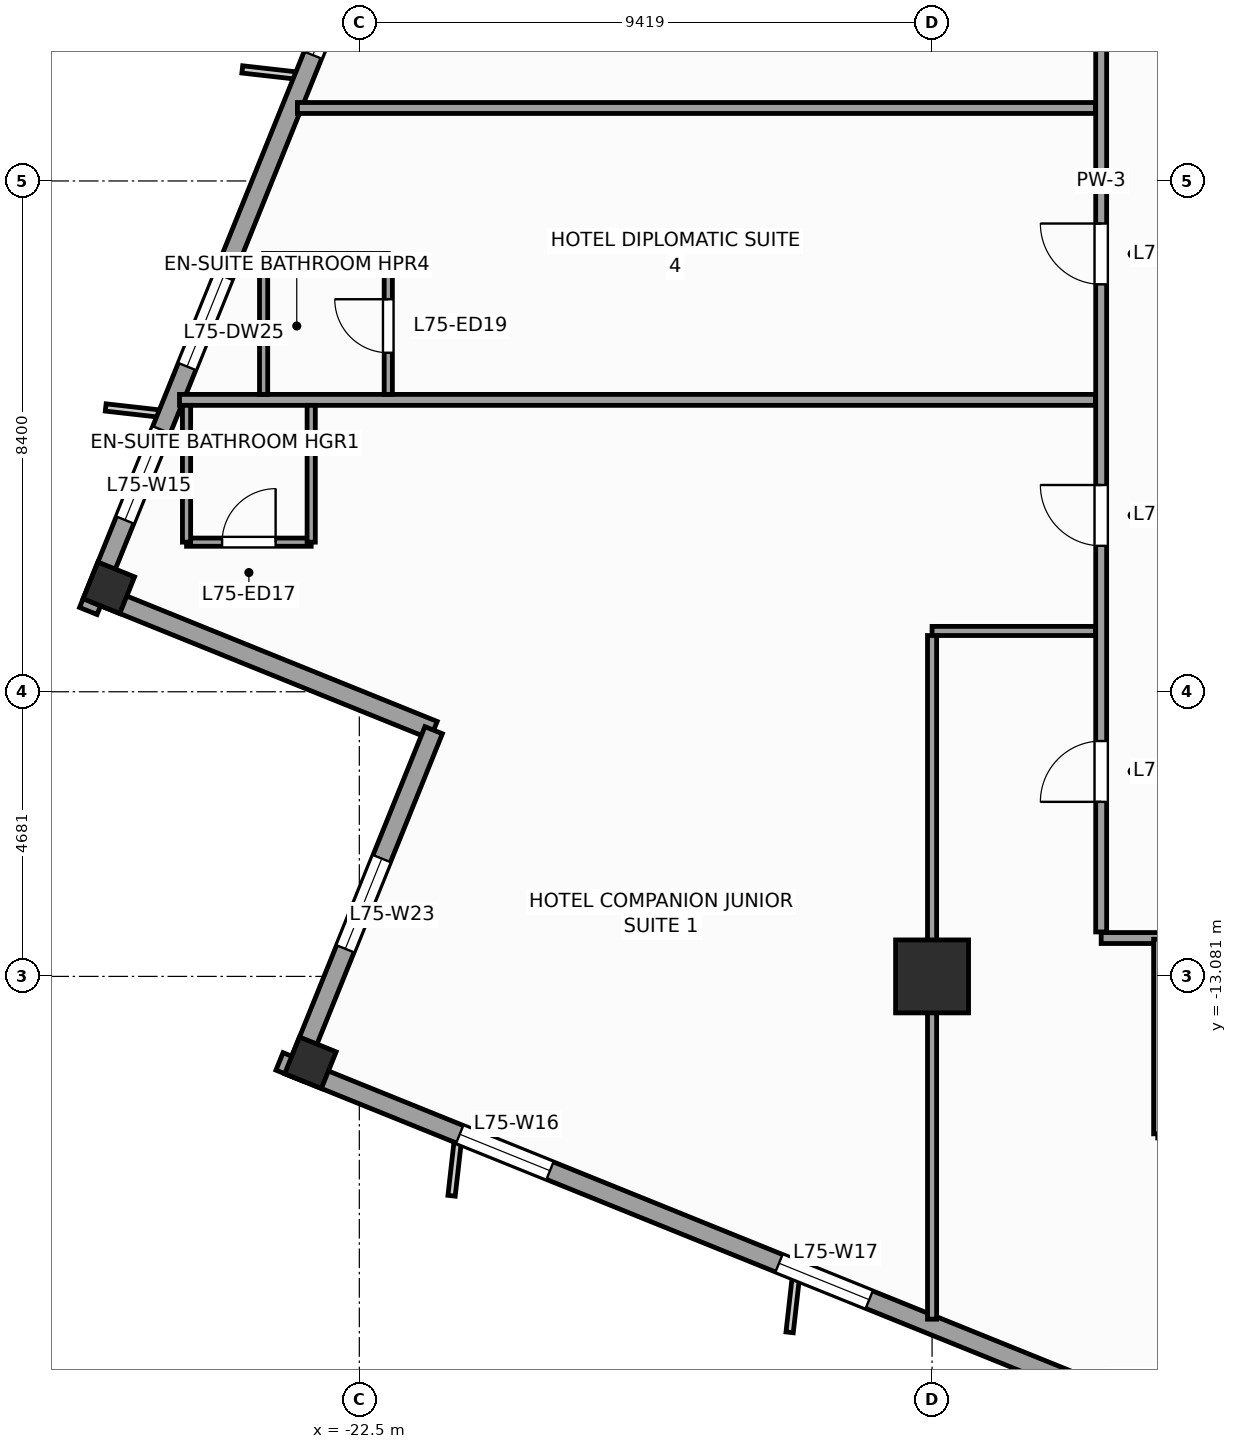
"""IFC4 building model, lengths in metres.
Left out: names, types, materials, properties, quantities, classifications, styles, units other than length and angle.
Written with IfcOpenShell. Run it as: python <this file> out.ifc"""

import sys

from ifc_helpers import new_model, si_unit, direction, frame, frame_2d, origin, origin_2d, place, context, subcontext, project, spatial, rectangle, extrude, source, transform, mapped, element, fill, save


model = new_model("IFC4")
c1 = context("Model", 3, precision=1e-05, world=origin(), true_north=direction((0.0, 1.0)))
c2 = subcontext(c1, "Body", "Model", "MODEL_VIEW")
j1 = project(units=[si_unit("LENGTHUNIT", "METRE"), si_unit("PLANEANGLEUNIT", "RADIAN")], contexts=[c1])
p1 = place(None, origin())
s1 = spatial("IfcSite", under=j1, at=p1, CompositionType="ELEMENT")
p2 = place(p1, origin())
s2 = spatial("IfcBuilding", under=s1, at=p2, CompositionType="ELEMENT")
p3 = place(p2, frame((0.0, 0.0, 304.8)))
s3 = spatial("IfcBuildingStorey", under=s2, at=p3, CompositionType="ELEMENT", Elevation=304.8)
m1 = source(origin(), c2, "Body", "SweptSolid", [
    extrude(rectangle(XDim=1.2, YDim=1.2, at=origin_2d()), origin(), (0.0, 0.0, 1.0), 3.6),
])
p4 = place(p3, frame((-13.081, -13.081, 0.0), z_axis=(0.0, 0.0, 1.0), x_axis=(1.0, 0.0, 0.0)))
e1 = element("IfcColumn", 1, at=p4, inside=s3, PredefinedType="COLUMN", context=c2, shape_type="MappedRepresentation", body=[
    mapped(m1, transform((0.0, 0.0, 0.0), scale=1.0)),
])
m2 = source(origin(), c2, "Body", "SweptSolid", [
    extrude(rectangle(XDim=0.65, YDim=0.65, at=origin_2d()), origin(), (0.0, 0.0, 1.0), 3.6),
])
for number, where, z_axis, x_axis in (
    (2, (-26.62, -6.69, 0.0), (0.0, 0.0, 1.0), (0.375, 0.927, 0.0)),
    (3, (-23.304, -14.501, 0.0), (0.0, 0.0, 1.0), (0.375, 0.927, 0.0)),
):
    element("IfcColumn", number, at=place(p3, frame(where, z_axis=z_axis, x_axis=x_axis)), inside=s3, PredefinedType="COLUMN", context=c2, shape_type="MappedRepresentation", body=[
        mapped(m2, transform((0.0, 0.0, 0.0), scale=1.0)),
    ])
p5 = place(p3, frame((-14.479, 23.813, 0.0), z_axis=(0.0, 0.0, 1.0), x_axis=(-0.374609557019, -0.927182657188, 0.0)))
e4 = element("IfcWall", 4, at=p5, inside=s3, PredefinedType="STANDARD", context=c2, shape_type="SweptSolid", body=[
    extrude(rectangle(XDim=33.31, YDim=0.31, at=frame_2d((16.655, 0.0))), origin(), (0.0, 0.0, 1.0), 2.75),
])
p6 = place(p5, frame((10.53, 0.0, 0.0)))
e5 = element("IfcOpeningElement", 5, at=p6, cuts=e4, PredefinedType="OPENING", context=c2, shape_type="SweptSolid", body=[
    extrude(rectangle(XDim=1.05, YDim=2.25, at=frame_2d((0.525, 1.125))), frame((0.0, 0.165, 0.0), z_axis=(0.0, -1.0, 0.0), x_axis=(1.0, 0.0, 0.0)), (0.0, 0.0, 1.0), 0.33),
])
p7 = place(p5, frame((3.197, 0.0, 0.47)))
e6 = element("IfcOpeningElement", 6, at=p7, cuts=e4, PredefinedType="OPENING", context=c2, shape_type="SweptSolid", body=[
    extrude(rectangle(XDim=1.6, YDim=2.1, at=frame_2d((0.8, 1.05))), frame((0.0, 0.165, 0.0), z_axis=(0.0, -1.0, 0.0), x_axis=(1.0, 0.0, 0.0)), (0.0, 0.0, 1.0), 0.33),
])
p8 = place(p5, frame((7.36, 0.0, 0.47)))
e7 = element("IfcOpeningElement", 7, at=p8, cuts=e4, PredefinedType="OPENING", context=c2, shape_type="SweptSolid", body=[
    extrude(rectangle(XDim=1.6, YDim=2.1, at=frame_2d((0.8, 1.05))), frame((0.0, 0.165, 0.0), z_axis=(0.0, -1.0, 0.0), x_axis=(1.0, 0.0, 0.0)), (0.0, 0.0, 1.0), 0.33),
])
p9 = place(p5, frame((14.439, 0.0, 0.47)))
e8 = element("IfcOpeningElement", 8, at=p9, cuts=e4, PredefinedType="OPENING", context=c2, shape_type="SweptSolid", body=[
    extrude(rectangle(XDim=1.6, YDim=2.1, at=frame_2d((0.8, 1.05))), frame((0.0, 0.165, 0.0), z_axis=(0.0, -1.0, 0.0), x_axis=(1.0, 0.0, 0.0)), (0.0, 0.0, 1.0), 0.33),
])
p10 = place(p5, frame((21.851, 0.0, 0.47)))
e9 = element("IfcOpeningElement", 9, at=p10, cuts=e4, PredefinedType="OPENING", context=c2, shape_type="SweptSolid", body=[
    extrude(rectangle(XDim=1.6, YDim=2.1, at=frame_2d((0.8, 1.05))), frame((0.0, 0.165, 0.0), z_axis=(0.0, -1.0, 0.0), x_axis=(1.0, 0.0, 0.0)), (0.0, 0.0, 1.0), 0.33),
])
p11 = place(p5, frame((30.097, 0.0, 0.47)))
e10 = element("IfcOpeningElement", 10, at=p11, cuts=e4, PredefinedType="OPENING", context=c2, shape_type="SweptSolid", body=[
    extrude(rectangle(XDim=1.6, YDim=2.1, at=frame_2d((0.8, 1.05))), frame((0.0, 0.165, 0.0), z_axis=(0.0, -1.0, 0.0), x_axis=(1.0, 0.0, 0.0)), (0.0, 0.0, 1.0), 0.33),
])
p12 = place(p5, frame((27.374, 0.0, 0.47)))
e11 = element("IfcOpeningElement", 11, at=p12, cuts=e4, PredefinedType="OPENING", context=c2, shape_type="SweptSolid", body=[
    extrude(rectangle(XDim=1.6, YDim=2.1, at=frame_2d((0.8, 1.05))), frame((0.0, 0.165, 0.0), z_axis=(0.0, -1.0, 0.0), x_axis=(1.0, 0.0, 0.0)), (0.0, 0.0, 1.0), 0.33),
])
p13 = place(p3, frame((-26.841, -6.784, 0.0), z_axis=(0.0, 0.0, 1.0), x_axis=(0.927171722085, -0.374636620962, 0.0)))
e12 = element("IfcWall", 12, at=p13, inside=s3, PredefinedType="STANDARD", context=c2, shape_type="SweptSolid", body=[
    extrude(rectangle(XDim=6.0, YDim=0.31, at=frame_2d((3.0, 0.0))), origin(), (0.0, 0.0, 1.0), 2.65),
])
p14 = place(p3, frame((-21.278, -9.032, 0.0), z_axis=(0.0, 0.0, 1.0), x_axis=(-0.374602739196, -0.927185411764, 0.0)))
e13 = element("IfcWall", 13, at=p14, inside=s3, PredefinedType="STANDARD", context=c2, shape_type="SweptSolid", body=[
    extrude(rectangle(XDim=6.155, YDim=0.31, at=frame_2d((3.078, 0.0))), origin(), (0.0, 0.0, 1.0), 3.35),
])
p15 = place(p14, frame((2.278, 0.0, 0.47)))
e14 = element("IfcOpeningElement", 14, at=p15, cuts=e13, PredefinedType="OPENING", context=c2, shape_type="SweptSolid", body=[
    extrude(rectangle(XDim=1.6, YDim=2.1, at=frame_2d((0.8, 1.05))), frame((0.0, 0.165, 0.0), z_axis=(0.0, -1.0, 0.0), x_axis=(1.0, 0.0, 0.0)), (0.0, 0.0, 1.0), 0.33),
])
p16 = place(p3, frame((-23.813, -14.479, 0.0), z_axis=(0.0, 0.0, 1.0), x_axis=(0.927182657188, -0.374609557019, 0.0)))
e15 = element("IfcWall", 15, at=p16, inside=s3, PredefinedType="STANDARD", context=c2, shape_type="SweptSolid", body=[
    extrude(rectangle(XDim=33.31, YDim=0.31, at=frame_2d((16.655, 0.0))), origin(), (0.0, 0.0, 1.0), 2.75),
])
p17 = place(p16, frame((3.197, 0.0, 0.47)))
e16 = element("IfcOpeningElement", 16, at=p17, cuts=e15, PredefinedType="OPENING", context=c2, shape_type="SweptSolid", body=[
    extrude(rectangle(XDim=1.6, YDim=2.1, at=frame_2d((0.8, 1.05))), frame((0.0, 0.165, 0.0), z_axis=(0.0, -1.0, 0.0), x_axis=(1.0, 0.0, 0.0)), (0.0, 0.0, 1.0), 0.33),
])
p18 = place(p16, frame((8.86, 0.0, 0.47)))
e17 = element("IfcOpeningElement", 17, at=p18, cuts=e15, PredefinedType="OPENING", context=c2, shape_type="SweptSolid", body=[
    extrude(rectangle(XDim=1.6, YDim=2.1, at=frame_2d((0.8, 1.05))), frame((0.0, 0.165, 0.0), z_axis=(0.0, -1.0, 0.0), x_axis=(1.0, 0.0, 0.0)), (0.0, 0.0, 1.0), 0.33),
])
p19 = place(p16, frame((14.439, 0.0, 0.47)))
e18 = element("IfcOpeningElement", 18, at=p19, cuts=e15, PredefinedType="OPENING", context=c2, shape_type="SweptSolid", body=[
    extrude(rectangle(XDim=1.6, YDim=2.1, at=frame_2d((0.8, 1.05))), frame((0.0, 0.165, 0.0), z_axis=(0.0, -1.0, 0.0), x_axis=(1.0, 0.0, 0.0)), (0.0, 0.0, 1.0), 0.33),
])
p20 = place(p16, frame((23.351, 0.0, 0.47)))
e19 = element("IfcOpeningElement", 19, at=p20, cuts=e15, PredefinedType="OPENING", context=c2, shape_type="SweptSolid", body=[
    extrude(rectangle(XDim=1.6, YDim=2.1, at=frame_2d((0.8, 1.05))), frame((0.0, 0.165, 0.0), z_axis=(0.0, -1.0, 0.0), x_axis=(1.0, 0.0, 0.0)), (0.0, 0.0, 1.0), 0.33),
])
p21 = place(p16, frame((29.347, 0.0, 0.47)))
e20 = element("IfcOpeningElement", 20, at=p21, cuts=e15, PredefinedType="OPENING", context=c2, shape_type="SweptSolid", body=[
    extrude(rectangle(XDim=1.6, YDim=2.1, at=frame_2d((0.8, 1.05))), frame((0.0, 0.165, 0.0), z_axis=(0.0, -1.0, 0.0), x_axis=(1.0, 0.0, 0.0)), (0.0, 0.0, 1.0), 0.33),
])
p22 = place(p3, frame((-10.3, -12.45, 0.0), z_axis=(0.0, 0.0, 1.0), x_axis=(1.0, 0.0, 0.0)))
e21 = element("IfcWall", 21, at=p22, inside=s3, PredefinedType="PARTITIONING", context=c2, shape_type="SweptSolid", body=[
    extrude(rectangle(XDim=20.6, YDim=0.18, at=frame_2d((10.3, 0.0))), origin(), (0.0, 0.0, 1.0), 3.35),
])
p23 = place(p22, frame((1.605, 0.0, 0.0)))
e22 = element("IfcOpeningElement", 22, at=p23, cuts=e21, PredefinedType="OPENING", context=c2, shape_type="SweptSolid", body=[
    extrude(rectangle(XDim=0.95, YDim=2.1, at=frame_2d((0.475, 1.05))), frame((0.0, 0.1, 0.0), z_axis=(0.0, -1.0, 0.0), x_axis=(1.0, 0.0, 0.0)), (0.0, 0.0, 1.0), 0.2),
])
p24 = place(p22, frame((16.036, 0.0, 0.0)))
e23 = element("IfcOpeningElement", 23, at=p24, cuts=e21, PredefinedType="OPENING", context=c2, shape_type="SweptSolid", body=[
    extrude(rectangle(XDim=1.0, YDim=2.15, at=frame_2d((0.5, 1.075))), frame((0.0, 0.1, 0.0), z_axis=(0.0, -1.0, 0.0), x_axis=(1.0, 0.0, 0.0)), (0.0, 0.0, 1.0), 0.2),
])
p25 = place(p22, frame((9.55, 0.0, 0.0)))
e24 = element("IfcOpeningElement", 24, at=p25, cuts=e21, PredefinedType="OPENING", context=c2, shape_type="SweptSolid", body=[
    extrude(rectangle(XDim=1.0, YDim=2.15, at=frame_2d((0.5, 1.075))), frame((0.0, 0.1, 0.0), z_axis=(0.0, -1.0, 0.0), x_axis=(1.0, 0.0, 0.0)), (0.0, 0.0, 1.0), 0.2),
])
p26 = place(p3, frame((-10.3, -12.35, 0.0), z_axis=(0.0, 0.0, 1.0), x_axis=(0.0, 1.0, 0.0)))
e25 = element("IfcWall", 25, at=p26, inside=s3, PredefinedType="PARTITIONING", context=c2, shape_type="SweptSolid", body=[
    extrude(rectangle(XDim=24.7, YDim=0.18, at=frame_2d((12.35, 0.0))), origin(), (0.0, 0.0, 1.0), 3.35),
])
p27 = place(p26, frame((16.15, 0.0, 0.0)))
e26 = element("IfcOpeningElement", 26, at=p27, cuts=e25, PredefinedType="OPENING", context=c2, shape_type="SweptSolid", body=[
    extrude(rectangle(XDim=1.0, YDim=2.15, at=frame_2d((0.5, 1.075))), frame((0.0, 0.1, 0.0), z_axis=(0.0, -1.0, 0.0), x_axis=(1.0, 0.0, 0.0)), (0.0, 0.0, 1.0), 0.2),
])
p28 = place(p26, frame((2.139, 0.0, 0.0)))
e27 = element("IfcOpeningElement", 27, at=p28, cuts=e25, PredefinedType="OPENING", context=c2, shape_type="SweptSolid", body=[
    extrude(rectangle(XDim=1.0, YDim=2.15, at=frame_2d((0.5, 1.075))), frame((0.0, 0.1, 0.0), z_axis=(0.0, -1.0, 0.0), x_axis=(1.0, 0.0, 0.0)), (0.0, 0.0, 1.0), 0.2),
])
p29 = place(p26, frame((6.35, 0.0, 0.0)))
e28 = element("IfcOpeningElement", 28, at=p29, cuts=e25, PredefinedType="OPENING", context=c2, shape_type="SweptSolid", body=[
    extrude(rectangle(XDim=1.0, YDim=2.15, at=frame_2d((0.5, 1.075))), frame((0.0, 0.1, 0.0), z_axis=(0.0, -1.0, 0.0), x_axis=(1.0, 0.0, 0.0)), (0.0, 0.0, 1.0), 0.2),
])
p30 = place(p26, frame((10.65, 0.0, 0.0)))
e29 = element("IfcOpeningElement", 29, at=p30, cuts=e25, PredefinedType="OPENING", context=c2, shape_type="SweptSolid", body=[
    extrude(rectangle(XDim=1.0, YDim=2.15, at=frame_2d((0.5, 1.075))), frame((0.0, 0.1, 0.0), z_axis=(0.0, -1.0, 0.0), x_axis=(1.0, 0.0, 0.0)), (0.0, 0.0, 1.0), 0.2),
])
p31 = place(p3, frame((-10.395, -3.6, 0.0), z_axis=(0.0, 0.0, 1.0), x_axis=(-1.0, 0.0, 0.0)))
e30 = element("IfcWall", 30, at=p31, inside=s3, PredefinedType="PARTITIONING", context=c2, shape_type="SweptSolid", body=[
    extrude(rectangle(XDim=15.062, YDim=0.18, at=frame_2d((7.531, 0.0))), origin(), (0.0, 0.0, 1.0), 3.35),
])
p32 = place(p3, frame((-10.395, 1.2, 0.0), z_axis=(0.0, 0.0, 1.0), x_axis=(-1.0, 0.0, 0.0)))
e31 = element("IfcWall", 31, at=p32, inside=s3, PredefinedType="PARTITIONING", context=c2, shape_type="SweptSolid", body=[
    extrude(rectangle(XDim=13.123, YDim=0.18, at=frame_2d((6.562, 0.0))), origin(), (0.0, 0.0, 1.0), 3.35),
])
p33 = place(p3, frame((-10.395, -7.4, 0.0), z_axis=(0.0, 0.0, 1.0), x_axis=(-1.0, 0.0, 0.0)))
e32 = element("IfcWall", 32, at=p33, inside=s3, PredefinedType="PARTITIONING", context=c2, shape_type="SweptSolid", body=[
    extrude(rectangle(XDim=2.686, YDim=0.15, at=frame_2d((1.343, 0.0))), origin(), (0.0, 0.0, 1.0), 3.35),
])
p34 = place(p3, frame((-13.081, -7.475, 0.0), z_axis=(0.0, 0.0, 1.0), x_axis=(0.0, -1.0, 0.0)))
e33 = element("IfcWall", 33, at=p34, inside=s3, PredefinedType="PARTITIONING", context=c2, shape_type="SweptSolid", body=[
    extrude(rectangle(XDim=11.243, YDim=0.15, at=frame_2d((5.621, 0.0))), origin(), (0.0, 0.0, 1.0), 2.45),
])
p35 = place(p3, frame((-9.37, -15.67, 0.0), z_axis=(0.0, 0.0, 1.0), x_axis=(0.0, 1.0, 0.0)))
e34 = element("IfcWall", 34, at=p35, inside=s3, PredefinedType="PARTITIONING", context=c2, shape_type="SweptSolid", body=[
    extrude(rectangle(XDim=3.2, YDim=0.135, at=frame_2d((1.6, 0.0))), origin(), (0.0, 0.0, 1.0), 3.35),
])
p36 = place(p3, frame((-25.342, -5.94, 0.0), z_axis=(0.0, 0.0, 1.0), x_axis=(1.0, 0.0, 0.0)))
e35 = element("IfcWall", 35, at=p36, inside=s3, PredefinedType="PARTITIONING", context=c2, shape_type="SweptSolid", body=[
    extrude(rectangle(XDim=2.05, YDim=0.135, at=frame_2d((1.025, 0.0))), origin(), (0.0, 0.0, 1.0), 3.35),
])
p37 = place(p36, frame((0.585, 0.0, 0.0)))
e36 = element("IfcOpeningElement", 36, at=p37, cuts=e35, PredefinedType="OPENING", context=c2, shape_type="SweptSolid", body=[
    extrude(rectangle(XDim=0.88, YDim=2.1, at=frame_2d((0.44, 1.05))), frame((0.0, 0.078, 0.0), z_axis=(0.0, -1.0, 0.0), x_axis=(1.0, 0.0, 0.0)), (0.0, 0.0, 1.0), 0.155),
])
p38 = place(p3, frame((-23.292, -5.94, 0.0), z_axis=(0.0, 0.0, 1.0), x_axis=(0.0, 1.0, 0.0)))
e37 = element("IfcWall", 37, at=p38, inside=s3, PredefinedType="PARTITIONING", context=c2, shape_type="SweptSolid", body=[
    extrude(rectangle(XDim=2.25, YDim=0.135, at=frame_2d((1.125, 0.0))), origin(), (0.0, 0.0, 1.0), 2.95),
])
p39 = place(p3, frame((-25.342, -5.94, 0.0), z_axis=(0.0, 0.0, 1.0), x_axis=(0.0, 1.0, 0.0)))
e38 = element("IfcWall", 38, at=p39, inside=s3, PredefinedType="PARTITIONING", context=c2, shape_type="SweptSolid", body=[
    extrude(rectangle(XDim=2.25, YDim=0.135, at=frame_2d((1.125, 0.0))), origin(), (0.0, 0.0, 1.0), 2.75),
])
p40 = place(p3, frame((-22.024, -3.51, 0.0), z_axis=(0.0, 0.0, 1.0), x_axis=(0.0, 1.0, 0.0)))
e39 = element("IfcWall", 39, at=p40, inside=s3, PredefinedType="PARTITIONING", context=c2, shape_type="SweptSolid", body=[
    extrude(rectangle(XDim=2.25, YDim=0.135, at=frame_2d((1.125, 0.0))), origin(), (0.0, 0.0, 1.0), 3.35),
])
p41 = place(p40, frame((0.685, 0.0, 0.0)))
e40 = element("IfcOpeningElement", 40, at=p41, cuts=e39, PredefinedType="OPENING", context=c2, shape_type="SweptSolid", body=[
    extrude(rectangle(XDim=0.88, YDim=2.1, at=frame_2d((0.44, 1.05))), frame((0.0, 0.078, 0.0), z_axis=(0.0, -1.0, 0.0), x_axis=(1.0, 0.0, 0.0)), (0.0, 0.0, 1.0), 0.155),
])
p42 = place(p3, frame((-24.074, -1.26, 0.0), z_axis=(0.0, 0.0, 1.0), x_axis=(1.0, 0.0, 0.0)))
e41 = element("IfcWall", 41, at=p42, inside=s3, PredefinedType="PARTITIONING", context=c2, shape_type="SweptSolid", body=[
    extrude(rectangle(XDim=2.05, YDim=0.135, at=frame_2d((1.025, 0.0))), origin(), (0.0, 0.0, 1.0), 3.35),
])
p43 = place(p3, frame((-24.074, -3.51, 0.0), z_axis=(0.0, 0.0, 1.0), x_axis=(0.0, 1.0, 0.0)))
e42 = element("IfcWall", 42, at=p43, inside=s3, PredefinedType="PARTITIONING", context=c2, shape_type="SweptSolid", body=[
    extrude(rectangle(XDim=2.25, YDim=0.135, at=frame_2d((1.125, 0.0))), origin(), (0.0, 0.0, 1.0), 3.35),
])
m3 = source(origin(), c2, "Body", "SweptSolid", [
    extrude(rectangle(XDim=1.6, YDim=2.1, at=frame_2d((0.8, 1.05))), frame((0.0, 0.03, 0.0), z_axis=(0.0, -1.0, 0.0), x_axis=(1.0, 0.0, 0.0)), (0.0, 0.0, 1.0), 0.06),
])
p44 = place(p10, origin())
e43 = element("IfcWindow", 43, at=p44, inside=s3, PartitioningType="SINGLE_PANEL", PredefinedType="WINDOW", context=c2, shape_type="MappedRepresentation", body=[
    mapped(m3, transform((0.0, 0.0, 0.0), scale=1.0)),
])
fill(e9, e43)
p45 = place(p11, origin())
e44 = element("IfcWindow", 44, at=p45, inside=s3, PartitioningType="SINGLE_PANEL", PredefinedType="WINDOW", context=c2, shape_type="MappedRepresentation", body=[
    mapped(m3, transform((0.0, 0.0, 0.0), scale=1.0)),
])
fill(e10, e44)
p46 = place(p17, origin())
e45 = element("IfcWindow", 45, at=p46, inside=s3, PartitioningType="SINGLE_PANEL", PredefinedType="WINDOW", context=c2, shape_type="MappedRepresentation", body=[
    mapped(m3, transform((0.0, 0.0, 0.0), scale=1.0)),
])
fill(e16, e45)
p47 = place(p18, origin())
e46 = element("IfcWindow", 46, at=p47, inside=s3, PartitioningType="SINGLE_PANEL", PredefinedType="WINDOW", context=c2, shape_type="MappedRepresentation", body=[
    mapped(m3, transform((0.0, 0.0, 0.0), scale=1.0)),
])
fill(e17, e46)
p48 = place(p15, origin())
e47 = element("IfcWindow", 47, at=p48, inside=s3, PartitioningType="SINGLE_PANEL", PredefinedType="WINDOW", context=c2, shape_type="MappedRepresentation", body=[
    mapped(m3, transform((0.0, 0.0, 0.0), scale=1.0)),
])
fill(e14, e47)
m4 = source(origin(), c2, "Body", "SweptSolid", [
    extrude(rectangle(XDim=1.0, YDim=2.15, at=frame_2d((0.5, 1.075))), frame((0.0, 0.025, 0.0), z_axis=(0.0, -1.0, 0.0), x_axis=(1.0, 0.0, 0.0)), (0.0, 0.0, 1.0), 0.05),
])
p49 = place(p28, origin())
e48 = element("IfcDoor", 48, at=p49, inside=s3, OperationType="SINGLE_SWING_LEFT", PredefinedType="DOOR", context=c2, shape_type="MappedRepresentation", body=[
    mapped(m4, transform((0.0, 0.0, 0.0), scale=1.0)),
])
fill(e27, e48)
p50 = place(p29, origin())
e49 = element("IfcDoor", 49, at=p50, inside=s3, OperationType="SINGLE_SWING_RIGHT", PredefinedType="DOOR", context=c2, shape_type="MappedRepresentation", body=[
    mapped(m4, transform((0.0, 0.0, 0.0), scale=1.0)),
])
fill(e28, e49)
m5 = source(origin(), c2, "Body", "SweptSolid", [
    extrude(rectangle(XDim=0.88, YDim=2.1, at=frame_2d((0.44, 1.05))), frame((0.0, 0.025, 0.0), z_axis=(0.0, -1.0, 0.0), x_axis=(1.0, 0.0, 0.0)), (0.0, 0.0, 1.0), 0.05),
])
p51 = place(p37, origin())
e50 = element("IfcDoor", 50, at=p51, inside=s3, OperationType="SINGLE_SWING_RIGHT", PredefinedType="DOOR", context=c2, shape_type="MappedRepresentation", body=[
    mapped(m5, transform((0.0, 0.0, 0.0), scale=1.0)),
])
fill(e36, e50)
p52 = place(p30, origin())
e51 = element("IfcDoor", 51, at=p52, inside=s3, OperationType="SINGLE_SWING_RIGHT", PredefinedType="DOOR", context=c2, shape_type="MappedRepresentation", body=[
    mapped(m4, transform((0.0, 0.0, 0.0), scale=1.0)),
])
fill(e29, e51)
p53 = place(p41, origin())
e52 = element("IfcDoor", 52, at=p53, inside=s3, OperationType="SINGLE_SWING_RIGHT", PredefinedType="DOOR", context=c2, shape_type="MappedRepresentation", body=[
    mapped(m5, transform((0.0, 0.0, 0.0), scale=1.0)),
])
fill(e40, e52)
p54 = place(p12, origin())
e53 = element("IfcWindow", 53, at=p54, inside=s3, PartitioningType="SINGLE_PANEL", PredefinedType="WINDOW", context=c2, shape_type="MappedRepresentation", body=[
    mapped(m3, transform((0.0, 0.0, 0.0), scale=1.0)),
])
fill(e11, e53)
save(model, sys.argv[1])
